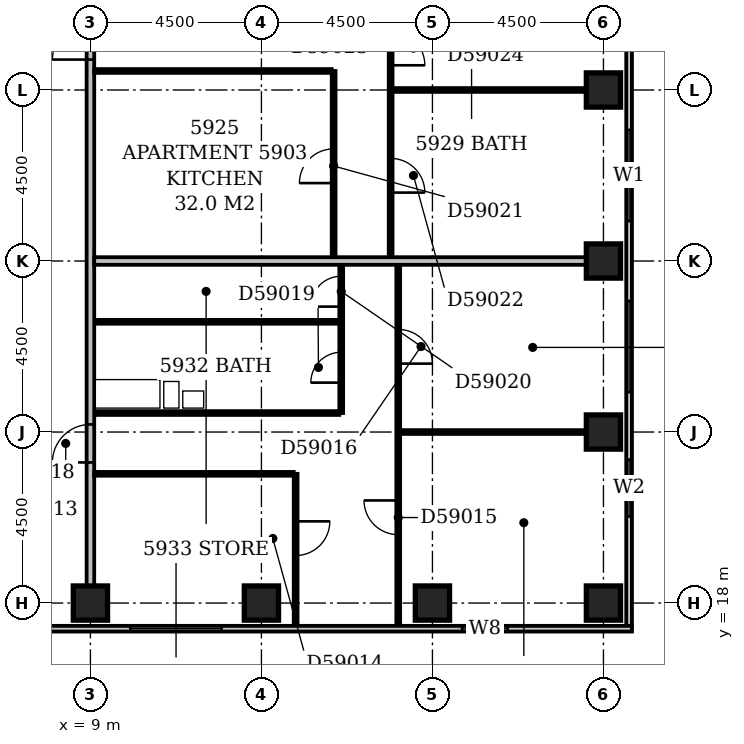
"""IFC4 building model, lengths in metres.
Left out: names, types, materials, properties, quantities, classifications, styles, units other than length and angle.
Written with IfcOpenShell. Run it as: python <this file> out.ifc"""

import sys

from ifc_helpers import new_model, si_unit, direction, frame, frame_2d, origin, origin_2d, place, context, subcontext, project, spatial, rectangle, extrude, element, fill, save


model = new_model("IFC4")
c1 = context("Model", 3, precision=1e-05, world=origin(), true_north=direction((0.0, 1.0)))
c2 = subcontext(c1, "Body", "Model", "MODEL_VIEW")
j1 = project(units=[si_unit("LENGTHUNIT", "METRE"), si_unit("PLANEANGLEUNIT", "RADIAN")], contexts=[c1])
p1 = place(None, origin())
s1 = spatial("IfcSite", under=j1, at=p1, CompositionType="ELEMENT")
p2 = place(p1, origin())
s2 = spatial("IfcBuilding", under=s1, at=p2, CompositionType="ELEMENT")
p3 = place(p2, frame((0.0, 0.0, 229.4)))
s3 = spatial("IfcBuildingStorey", under=s2, at=p3, CompositionType="ELEMENT", Elevation=229.4)
for number, where, z_axis, x_axis in (
    (1, (9.0, 18.0, -0.3), (0.0, 0.0, 1.0), (1.0, 0.0, 0.0)),
    (2, (13.5, 18.0, -0.3), (0.0, 0.0, 1.0), (1.0, 0.0, 0.0)),
    (3, (18.0, 18.0, -0.3), (0.0, 0.0, 1.0), (1.0, 0.0, 0.0)),
    (4, (22.5, 18.0, -0.3), (0.0, 0.0, 1.0), (1.0, 0.0, 0.0)),
    (5, (22.5, 22.5, -0.3), (0.0, 0.0, 1.0), (1.0, 0.0, 0.0)),
    (6, (22.5, 27.0, -0.3), (0.0, 0.0, 1.0), (1.0, 0.0, 0.0)),
    (7, (22.5, 31.5, -0.3), (0.0, 0.0, 1.0), (1.0, 0.0, 0.0)),
):
    element("IfcColumn", number, at=place(p3, frame(where, z_axis=z_axis, x_axis=x_axis)), inside=s3, PredefinedType="COLUMN", context=c2, shape_type="SweptSolid", body=[
        extrude(rectangle(XDim=0.9, YDim=0.9, at=origin_2d()), origin(), (0.0, 0.0, 1.0), 3.55),
    ])
p4 = place(p3, frame((3.9, 17.325, 0.0), z_axis=(0.0, 0.0, 1.0), x_axis=(1.0, 0.0, 0.0)))
e8 = element("IfcWall", 8, at=p4, inside=s3, PredefinedType="STANDARD", context=c2, shape_type="SweptSolid", body=[
    extrude(rectangle(XDim=19.35, YDim=0.15, at=frame_2d((9.675, 0.0))), origin(), (0.0, 0.0, 1.0), 2.7),
])
p5 = place(p4, frame((6.15, 0.0, 0.6)))
e9 = element("IfcOpeningElement", 9, at=p5, cuts=e8, PredefinedType="OPENING", context=c2, shape_type="SweptSolid", body=[
    extrude(rectangle(XDim=2.4, YDim=1.8, at=frame_2d((1.2, 0.9))), frame((0.0, 0.087, 0.0), z_axis=(0.0, -1.0, 0.0), x_axis=(1.0, 0.0, 0.0)), (0.0, 0.0, 1.0), 0.174),
])
p6 = place(p4, frame((14.881, 0.0, 0.6)))
e10 = element("IfcOpeningElement", 10, at=p6, cuts=e8, PredefinedType="OPENING", context=c2, shape_type="SweptSolid", body=[
    extrude(rectangle(XDim=1.2, YDim=1.8, at=frame_2d((0.6, 0.9))), frame((0.0, 0.087, 0.0), z_axis=(0.0, -1.0, 0.0), x_axis=(1.0, 0.0, 0.0)), (0.0, 0.0, 1.0), 0.174),
])
p7 = place(p3, frame((23.175, 17.4, 0.0), z_axis=(0.0, 0.0, 1.0), x_axis=(0.0, 1.0, 0.0)))
e11 = element("IfcWall", 11, at=p7, inside=s3, PredefinedType="STANDARD", context=c2, shape_type="SweptSolid", body=[
    extrude(rectangle(XDim=17.85, YDim=0.15, at=frame_2d((8.925, 0.0))), origin(), (0.0, 0.0, 1.0), 2.7),
])
p8 = place(p7, frame((2.876, 0.0, 0.6)))
e12 = element("IfcOpeningElement", 12, at=p8, cuts=e11, PredefinedType="OPENING", context=c2, shape_type="SweptSolid", body=[
    extrude(rectangle(XDim=1.5, YDim=1.8, at=frame_2d((0.75, 0.9))), frame((0.0, 0.087, 0.0), z_axis=(0.0, -1.0, 0.0), x_axis=(1.0, 0.0, 0.0)), (0.0, 0.0, 1.0), 0.174),
])
p9 = place(p7, frame((6.15, 0.0, 0.6)))
e13 = element("IfcOpeningElement", 13, at=p9, cuts=e11, PredefinedType="OPENING", context=c2, shape_type="SweptSolid", body=[
    extrude(rectangle(XDim=2.4, YDim=1.8, at=frame_2d((1.2, 0.9))), frame((0.0, 0.087, 0.0), z_axis=(0.0, -1.0, 0.0), x_axis=(1.0, 0.0, 0.0)), (0.0, 0.0, 1.0), 0.174),
])
p10 = place(p7, frame((10.65, 0.0, 0.6)))
e14 = element("IfcOpeningElement", 14, at=p10, cuts=e11, PredefinedType="OPENING", context=c2, shape_type="SweptSolid", body=[
    extrude(rectangle(XDim=2.4, YDim=1.8, at=frame_2d((1.2, 0.9))), frame((0.0, 0.087, 0.0), z_axis=(0.0, -1.0, 0.0), x_axis=(1.0, 0.0, 0.0)), (0.0, 0.0, 1.0), 0.174),
])
p11 = place(p7, frame((15.15, 0.0, 0.6)))
e15 = element("IfcOpeningElement", 15, at=p11, cuts=e11, PredefinedType="OPENING", context=c2, shape_type="SweptSolid", body=[
    extrude(rectangle(XDim=2.4, YDim=1.8, at=frame_2d((1.2, 0.9))), frame((0.0, 0.087, 0.0), z_axis=(0.0, -1.0, 0.0), x_axis=(1.0, 0.0, 0.0)), (0.0, 0.0, 1.0), 0.174),
])
p12 = place(p3, frame((14.4, 17.4, 0.0), z_axis=(0.0, 0.0, 1.0), x_axis=(0.0, 1.0, 0.0)))
e16 = element("IfcWall", 16, at=p12, inside=s3, PredefinedType="PARTITIONING", context=c2, shape_type="SweptSolid", body=[
    extrude(rectangle(XDim=4.0, YDim=0.1, at=frame_2d((2.0, 0.0))), origin(), (0.0, 0.0, 1.0), 3.25),
])
p13 = place(p12, frame((1.85, 0.0, 0.0)))
e17 = element("IfcOpeningElement", 17, at=p13, cuts=e16, PredefinedType="OPENING", context=c2, shape_type="SweptSolid", body=[
    extrude(rectangle(XDim=0.9, YDim=2.1, at=frame_2d((0.45, 1.05))), frame((0.0, 0.062, 0.0), z_axis=(0.0, -1.0, 0.0), x_axis=(1.0, 0.0, 0.0)), (0.0, 0.0, 1.0), 0.124),
])
p14 = place(p3, frame((17.1, 17.4, 0.0), z_axis=(0.0, 0.0, 1.0), x_axis=(0.0, 1.0, 0.0)))
e18 = element("IfcWall", 18, at=p14, inside=s3, PredefinedType="PARTITIONING", context=c2, shape_type="SweptSolid", body=[
    extrude(rectangle(XDim=9.5, YDim=0.1, at=frame_2d((4.75, 0.0))), origin(), (0.0, 0.0, 1.0), 3.25),
])
p15 = place(p14, frame((2.4, 0.0, 0.0)))
e19 = element("IfcOpeningElement", 19, at=p15, cuts=e18, PredefinedType="OPENING", context=c2, shape_type="SweptSolid", body=[
    extrude(rectangle(XDim=0.9, YDim=2.1, at=frame_2d((0.45, 1.05))), frame((0.0, 0.062, 0.0), z_axis=(0.0, -1.0, 0.0), x_axis=(1.0, 0.0, 0.0)), (0.0, 0.0, 1.0), 0.124),
])
p16 = place(p14, frame((6.9, 0.0, 0.0)))
e20 = element("IfcOpeningElement", 20, at=p16, cuts=e18, PredefinedType="OPENING", context=c2, shape_type="SweptSolid", body=[
    extrude(rectangle(XDim=0.9, YDim=2.1, at=frame_2d((0.45, 1.05))), frame((0.0, 0.062, 0.0), z_axis=(0.0, -1.0, 0.0), x_axis=(1.0, 0.0, 0.0)), (0.0, 0.0, 1.0), 0.124),
])
p17 = place(p3, frame((9.0, 18.45, 0.0), z_axis=(0.0, 0.0, 1.0), x_axis=(0.0, 1.0, 0.0)))
e21 = element("IfcWall", 21, at=p17, inside=s3, PredefinedType="PARTITIONING", context=c2, shape_type="SweptSolid", body=[
    extrude(rectangle(XDim=17.55, YDim=0.2, at=frame_2d((8.775, 0.0))), origin(), (0.0, 0.0, 1.0), 3.25),
])
p18 = place(p17, frame((13.85, 0.0, 0.0)))
e22 = element("IfcOpeningElement", 22, at=p18, cuts=e21, PredefinedType="OPENING", context=c2, shape_type="SweptSolid", body=[
    extrude(rectangle(XDim=1.0, YDim=2.1, at=frame_2d((0.5, 1.05))), frame((0.0, 0.112, 0.0), z_axis=(0.0, -1.0, 0.0), x_axis=(1.0, 0.0, 0.0)), (0.0, 0.0, 1.0), 0.224),
])
p19 = place(p17, frame((3.25, 0.0, 0.0)))
e23 = element("IfcOpeningElement", 23, at=p19, cuts=e21, PredefinedType="OPENING", context=c2, shape_type="SweptSolid", body=[
    extrude(rectangle(XDim=1.0, YDim=2.1, at=frame_2d((0.5, 1.05))), frame((0.0, 0.112, 0.0), z_axis=(0.0, -1.0, 0.0), x_axis=(1.0, 0.0, 0.0)), (0.0, 0.0, 1.0), 0.224),
])
p20 = place(p3, frame((9.1, 21.4, 0.0), z_axis=(0.0, 0.0, 1.0), x_axis=(1.0, 0.0, 0.0)))
e24 = element("IfcWall", 24, at=p20, inside=s3, PredefinedType="PARTITIONING", context=c2, shape_type="SweptSolid", body=[
    extrude(rectangle(XDim=5.25, YDim=0.1, at=frame_2d((2.625, 0.0))), origin(), (0.0, 0.0, 1.0), 3.25),
])
p21 = place(p3, frame((17.15, 22.5, 0.0), z_axis=(0.0, 0.0, 1.0), x_axis=(1.0, 0.0, 0.0)))
e25 = element("IfcWall", 25, at=p21, inside=s3, PredefinedType="PARTITIONING", context=c2, shape_type="SweptSolid", body=[
    extrude(rectangle(XDim=4.9, YDim=0.1, at=frame_2d((2.45, 0.0))), origin(), (0.0, 0.0, 1.0), 3.25),
])
p22 = place(p3, frame((9.1, 23.0, 0.0), z_axis=(0.0, 0.0, 1.0), x_axis=(1.0, 0.0, 0.0)))
e26 = element("IfcWall", 26, at=p22, inside=s3, PredefinedType="PLUMBINGWALL", context=c2, shape_type="SweptSolid", body=[
    extrude(rectangle(XDim=6.45, YDim=0.1, at=frame_2d((3.225, 0.0))), origin(), (0.0, 0.0, 1.0), 3.25),
])
p23 = place(p3, frame((15.6, 23.0, 0.0), z_axis=(0.0, 0.0, 1.0), x_axis=(0.0, 1.0, 0.0)))
e27 = element("IfcWall", 27, at=p23, inside=s3, PredefinedType="PARTITIONING", context=c2, shape_type="SweptSolid", body=[
    extrude(rectangle(XDim=3.9, YDim=0.1, at=frame_2d((1.95, 0.0))), origin(), (0.0, 0.0, 1.0), 3.25),
])
p24 = place(p23, frame((0.8, 0.0, 0.0)))
e28 = element("IfcOpeningElement", 28, at=p24, cuts=e27, PredefinedType="OPENING", context=c2, shape_type="SweptSolid", body=[
    extrude(rectangle(XDim=0.8, YDim=2.1, at=frame_2d((0.4, 1.05))), frame((0.0, 0.062, 0.0), z_axis=(0.0, -1.0, 0.0), x_axis=(1.0, 0.0, 0.0)), (0.0, 0.0, 1.0), 0.124),
])
p25 = place(p23, frame((2.8, 0.0, 0.0)))
e29 = element("IfcOpeningElement", 29, at=p25, cuts=e27, PredefinedType="OPENING", context=c2, shape_type="SweptSolid", body=[
    extrude(rectangle(XDim=0.8, YDim=2.1, at=frame_2d((0.4, 1.05))), frame((0.0, 0.062, 0.0), z_axis=(0.0, -1.0, 0.0), x_axis=(1.0, 0.0, 0.0)), (0.0, 0.0, 1.0), 0.124),
])
p26 = place(p3, frame((9.1, 25.4, 0.0), z_axis=(0.0, 0.0, 1.0), x_axis=(1.0, 0.0, 0.0)))
e30 = element("IfcWall", 30, at=p26, inside=s3, PredefinedType="PLUMBINGWALL", context=c2, shape_type="SweptSolid", body=[
    extrude(rectangle(XDim=6.45, YDim=0.1, at=frame_2d((3.225, 0.0))), origin(), (0.0, 0.0, 1.0), 3.25),
])
p27 = place(p3, frame((9.1, 27.0, 0.0), z_axis=(0.0, 0.0, 1.0), x_axis=(1.0, 0.0, 0.0)))
e31 = element("IfcWall", 31, at=p27, inside=s3, PredefinedType="PARTITIONING", context=c2, shape_type="SweptSolid", body=[
    extrude(rectangle(XDim=12.95, YDim=0.2, at=frame_2d((6.475, 0.0))), origin(), (0.0, 0.0, 1.0), 2.65),
])
p28 = place(p3, frame((15.4, 27.1, 0.0), z_axis=(0.0, 0.0, 1.0), x_axis=(0.0, 1.0, 0.0)))
e32 = element("IfcWall", 32, at=p28, inside=s3, PredefinedType="PARTITIONING", context=c2, shape_type="SweptSolid", body=[
    extrude(rectangle(XDim=4.9, YDim=0.1, at=frame_2d((2.45, 0.0))), origin(), (0.0, 0.0, 1.0), 3.25),
])
p29 = place(p28, frame((1.95, 0.0, 0.0)))
e33 = element("IfcOpeningElement", 33, at=p29, cuts=e32, PredefinedType="OPENING", context=c2, shape_type="SweptSolid", body=[
    extrude(rectangle(XDim=0.9, YDim=2.1, at=frame_2d((0.45, 1.05))), frame((0.0, 0.062, 0.0), z_axis=(0.0, -1.0, 0.0), x_axis=(1.0, 0.0, 0.0)), (0.0, 0.0, 1.0), 0.124),
])
p30 = place(p3, frame((16.9, 27.1, 0.0), z_axis=(0.0, 0.0, 1.0), x_axis=(0.0, 1.0, 0.0)))
e34 = element("IfcWall", 34, at=p30, inside=s3, PredefinedType="PARTITIONING", context=c2, shape_type="SweptSolid", body=[
    extrude(rectangle(XDim=8.8, YDim=0.1, at=frame_2d((4.4, 0.0))), origin(), (0.0, 0.0, 1.0), 3.25),
])
p31 = place(p30, frame((1.7, 0.0, 0.0)))
e35 = element("IfcOpeningElement", 35, at=p31, cuts=e34, PredefinedType="OPENING", context=c2, shape_type="SweptSolid", body=[
    extrude(rectangle(XDim=0.9, YDim=2.1, at=frame_2d((0.45, 1.05))), frame((0.0, 0.062, 0.0), z_axis=(0.0, -1.0, 0.0), x_axis=(1.0, 0.0, 0.0)), (0.0, 0.0, 1.0), 0.124),
])
p32 = place(p30, frame((5.05, 0.0, 0.0)))
e36 = element("IfcOpeningElement", 36, at=p32, cuts=e34, PredefinedType="OPENING", context=c2, shape_type="SweptSolid", body=[
    extrude(rectangle(XDim=0.9, YDim=2.1, at=frame_2d((0.45, 1.05))), frame((0.0, 0.062, 0.0), z_axis=(0.0, -1.0, 0.0), x_axis=(1.0, 0.0, 0.0)), (0.0, 0.0, 1.0), 0.124),
])
p33 = place(p3, frame((16.95, 31.5, 0.0), z_axis=(0.0, 0.0, 1.0), x_axis=(1.0, 0.0, 0.0)))
e37 = element("IfcWall", 37, at=p33, inside=s3, PredefinedType="PARTITIONING", context=c2, shape_type="SweptSolid", body=[
    extrude(rectangle(XDim=5.1, YDim=0.1, at=frame_2d((2.55, 0.0))), origin(), (0.0, 0.0, 1.0), 3.25),
])
p34 = place(p3, frame((9.1, 32.0, 0.0), z_axis=(0.0, 0.0, 1.0), x_axis=(1.0, 0.0, 0.0)))
e38 = element("IfcWall", 38, at=p34, inside=s3, PredefinedType="PARTITIONING", context=c2, shape_type="SweptSolid", body=[
    extrude(rectangle(XDim=6.25, YDim=0.1, at=frame_2d((3.125, 0.0))), origin(), (0.0, 0.0, 1.0), 3.25),
])
p35 = place(p5, origin())
e39 = element("IfcWindow", 39, at=p35, inside=s3, PartitioningType="SINGLE_PANEL", PredefinedType="WINDOW", context=c2, shape_type="SweptSolid", body=[
    extrude(rectangle(XDim=2.4, YDim=1.8, at=frame_2d((1.2, 0.9))), frame((0.0, 0.03, 0.0), z_axis=(0.0, -1.0, 0.0), x_axis=(1.0, 0.0, 0.0)), (0.0, 0.0, 1.0), 0.06),
])
fill(e9, e39)
p36 = place(p6, origin())
e40 = element("IfcWindow", 40, at=p36, inside=s3, PartitioningType="SINGLE_PANEL", PredefinedType="WINDOW", context=c2, shape_type="SweptSolid", body=[
    extrude(rectangle(XDim=1.2, YDim=1.8, at=frame_2d((0.6, 0.9))), frame((0.0, 0.03, 0.0), z_axis=(0.0, -1.0, 0.0), x_axis=(1.0, 0.0, 0.0)), (0.0, 0.0, 1.0), 0.06),
])
fill(e10, e40)
p37 = place(p8, origin())
e41 = element("IfcWindow", 41, at=p37, inside=s3, PartitioningType="SINGLE_PANEL", PredefinedType="WINDOW", context=c2, shape_type="SweptSolid", body=[
    extrude(rectangle(XDim=1.5, YDim=1.8, at=frame_2d((0.75, 0.9))), frame((0.0, 0.03, 0.0), z_axis=(0.0, -1.0, 0.0), x_axis=(1.0, 0.0, 0.0)), (0.0, 0.0, 1.0), 0.06),
])
fill(e12, e41)
p38 = place(p9, origin())
e42 = element("IfcWindow", 42, at=p38, inside=s3, PartitioningType="SINGLE_PANEL", PredefinedType="WINDOW", context=c2, shape_type="SweptSolid", body=[
    extrude(rectangle(XDim=2.4, YDim=1.8, at=frame_2d((1.2, 0.9))), frame((0.0, 0.03, 0.0), z_axis=(0.0, -1.0, 0.0), x_axis=(1.0, 0.0, 0.0)), (0.0, 0.0, 1.0), 0.06),
])
fill(e13, e42)
p39 = place(p10, origin())
e43 = element("IfcWindow", 43, at=p39, inside=s3, PartitioningType="SINGLE_PANEL", PredefinedType="WINDOW", context=c2, shape_type="SweptSolid", body=[
    extrude(rectangle(XDim=2.4, YDim=1.8, at=frame_2d((1.2, 0.9))), frame((0.0, 0.03, 0.0), z_axis=(0.0, -1.0, 0.0), x_axis=(1.0, 0.0, 0.0)), (0.0, 0.0, 1.0), 0.06),
])
fill(e14, e43)
p40 = place(p13, origin())
e44 = element("IfcDoor", 44, at=p40, inside=s3, OperationType="SINGLE_SWING_RIGHT", PredefinedType="DOOR", context=c2, shape_type="SweptSolid", body=[
    extrude(rectangle(XDim=0.9, YDim=2.1, at=frame_2d((0.45, 1.05))), frame((0.0, 0.025, 0.0), z_axis=(0.0, -1.0, 0.0), x_axis=(1.0, 0.0, 0.0)), (0.0, 0.0, 1.0), 0.05),
])
fill(e17, e44)
p41 = place(p15, frame((0.9, 0.0, 0.0), z_axis=(0.0, 0.0, 1.0), x_axis=(-1.0, 0.0, 0.0)))
e45 = element("IfcDoor", 45, at=p41, inside=s3, OperationType="SINGLE_SWING_LEFT", PredefinedType="DOOR", context=c2, shape_type="SweptSolid", body=[
    extrude(rectangle(XDim=0.9, YDim=2.1, at=frame_2d((0.45, 1.05))), frame((0.0, 0.025, 0.0), z_axis=(0.0, -1.0, 0.0), x_axis=(1.0, 0.0, 0.0)), (0.0, 0.0, 1.0), 0.05),
])
fill(e19, e45)
p42 = place(p16, frame((0.9, 0.0, 0.0), z_axis=(0.0, 0.0, 1.0), x_axis=(-1.0, 0.0, 0.0)))
e46 = element("IfcDoor", 46, at=p42, inside=s3, OperationType="SINGLE_SWING_RIGHT", PredefinedType="DOOR", context=c2, shape_type="SweptSolid", body=[
    extrude(rectangle(XDim=0.9, YDim=2.1, at=frame_2d((0.45, 1.05))), frame((0.0, 0.025, 0.0), z_axis=(0.0, -1.0, 0.0), x_axis=(1.0, 0.0, 0.0)), (0.0, 0.0, 1.0), 0.05),
])
fill(e20, e46)
p43 = place(p18, origin())
e47 = element("IfcDoor", 47, at=p43, inside=s3, OperationType="SINGLE_SWING_LEFT", PredefinedType="DOOR", context=c2, shape_type="SweptSolid", body=[
    extrude(rectangle(XDim=1.0, YDim=2.1, at=frame_2d((0.5, 1.05))), frame((0.0, 0.025, 0.0), z_axis=(0.0, -1.0, 0.0), x_axis=(1.0, 0.0, 0.0)), (0.0, 0.0, 1.0), 0.05),
])
fill(e22, e47)
p44 = place(p19, origin())
e48 = element("IfcDoor", 48, at=p44, inside=s3, OperationType="SINGLE_SWING_LEFT", PredefinedType="DOOR", context=c2, shape_type="SweptSolid", body=[
    extrude(rectangle(XDim=1.0, YDim=2.1, at=frame_2d((0.5, 1.05))), frame((0.0, 0.025, 0.0), z_axis=(0.0, -1.0, 0.0), x_axis=(1.0, 0.0, 0.0)), (0.0, 0.0, 1.0), 0.05),
])
fill(e23, e48)
p45 = place(p24, origin())
e49 = element("IfcDoor", 49, at=p45, inside=s3, OperationType="SINGLE_SWING_LEFT", PredefinedType="DOOR", context=c2, shape_type="SweptSolid", body=[
    extrude(rectangle(XDim=0.8, YDim=2.1, at=frame_2d((0.4, 1.05))), frame((0.0, 0.025, 0.0), z_axis=(0.0, -1.0, 0.0), x_axis=(1.0, 0.0, 0.0)), (0.0, 0.0, 1.0), 0.05),
])
fill(e28, e49)
p46 = place(p25, origin())
e50 = element("IfcDoor", 50, at=p46, inside=s3, OperationType="SINGLE_SWING_LEFT", PredefinedType="DOOR", context=c2, shape_type="SweptSolid", body=[
    extrude(rectangle(XDim=0.8, YDim=2.1, at=frame_2d((0.4, 1.05))), frame((0.0, 0.025, 0.0), z_axis=(0.0, -1.0, 0.0), x_axis=(1.0, 0.0, 0.0)), (0.0, 0.0, 1.0), 0.05),
])
fill(e29, e50)
p47 = place(p29, origin())
e51 = element("IfcDoor", 51, at=p47, inside=s3, OperationType="SINGLE_SWING_LEFT", PredefinedType="DOOR", context=c2, shape_type="SweptSolid", body=[
    extrude(rectangle(XDim=0.9, YDim=2.1, at=frame_2d((0.45, 1.05))), frame((0.0, 0.025, 0.0), z_axis=(0.0, -1.0, 0.0), x_axis=(1.0, 0.0, 0.0)), (0.0, 0.0, 1.0), 0.05),
])
fill(e33, e51)
p48 = place(p31, frame((0.9, 0.0, 0.0), z_axis=(0.0, 0.0, 1.0), x_axis=(-1.0, 0.0, 0.0)))
e52 = element("IfcDoor", 52, at=p48, inside=s3, OperationType="SINGLE_SWING_RIGHT", PredefinedType="DOOR", context=c2, shape_type="SweptSolid", body=[
    extrude(rectangle(XDim=0.9, YDim=2.1, at=frame_2d((0.45, 1.05))), frame((0.0, 0.025, 0.0), z_axis=(0.0, -1.0, 0.0), x_axis=(1.0, 0.0, 0.0)), (0.0, 0.0, 1.0), 0.05),
])
fill(e35, e52)
p49 = place(p32, frame((0.9, 0.0, 0.0), z_axis=(0.0, 0.0, 1.0), x_axis=(-1.0, 0.0, 0.0)))
e53 = element("IfcDoor", 53, at=p49, inside=s3, OperationType="SINGLE_SWING_RIGHT", PredefinedType="DOOR", context=c2, shape_type="SweptSolid", body=[
    extrude(rectangle(XDim=0.9, YDim=2.1, at=frame_2d((0.45, 1.05))), frame((0.0, 0.025, 0.0), z_axis=(0.0, -1.0, 0.0), x_axis=(1.0, 0.0, 0.0)), (0.0, 0.0, 1.0), 0.05),
])
fill(e36, e53)
save(model, sys.argv[1])
